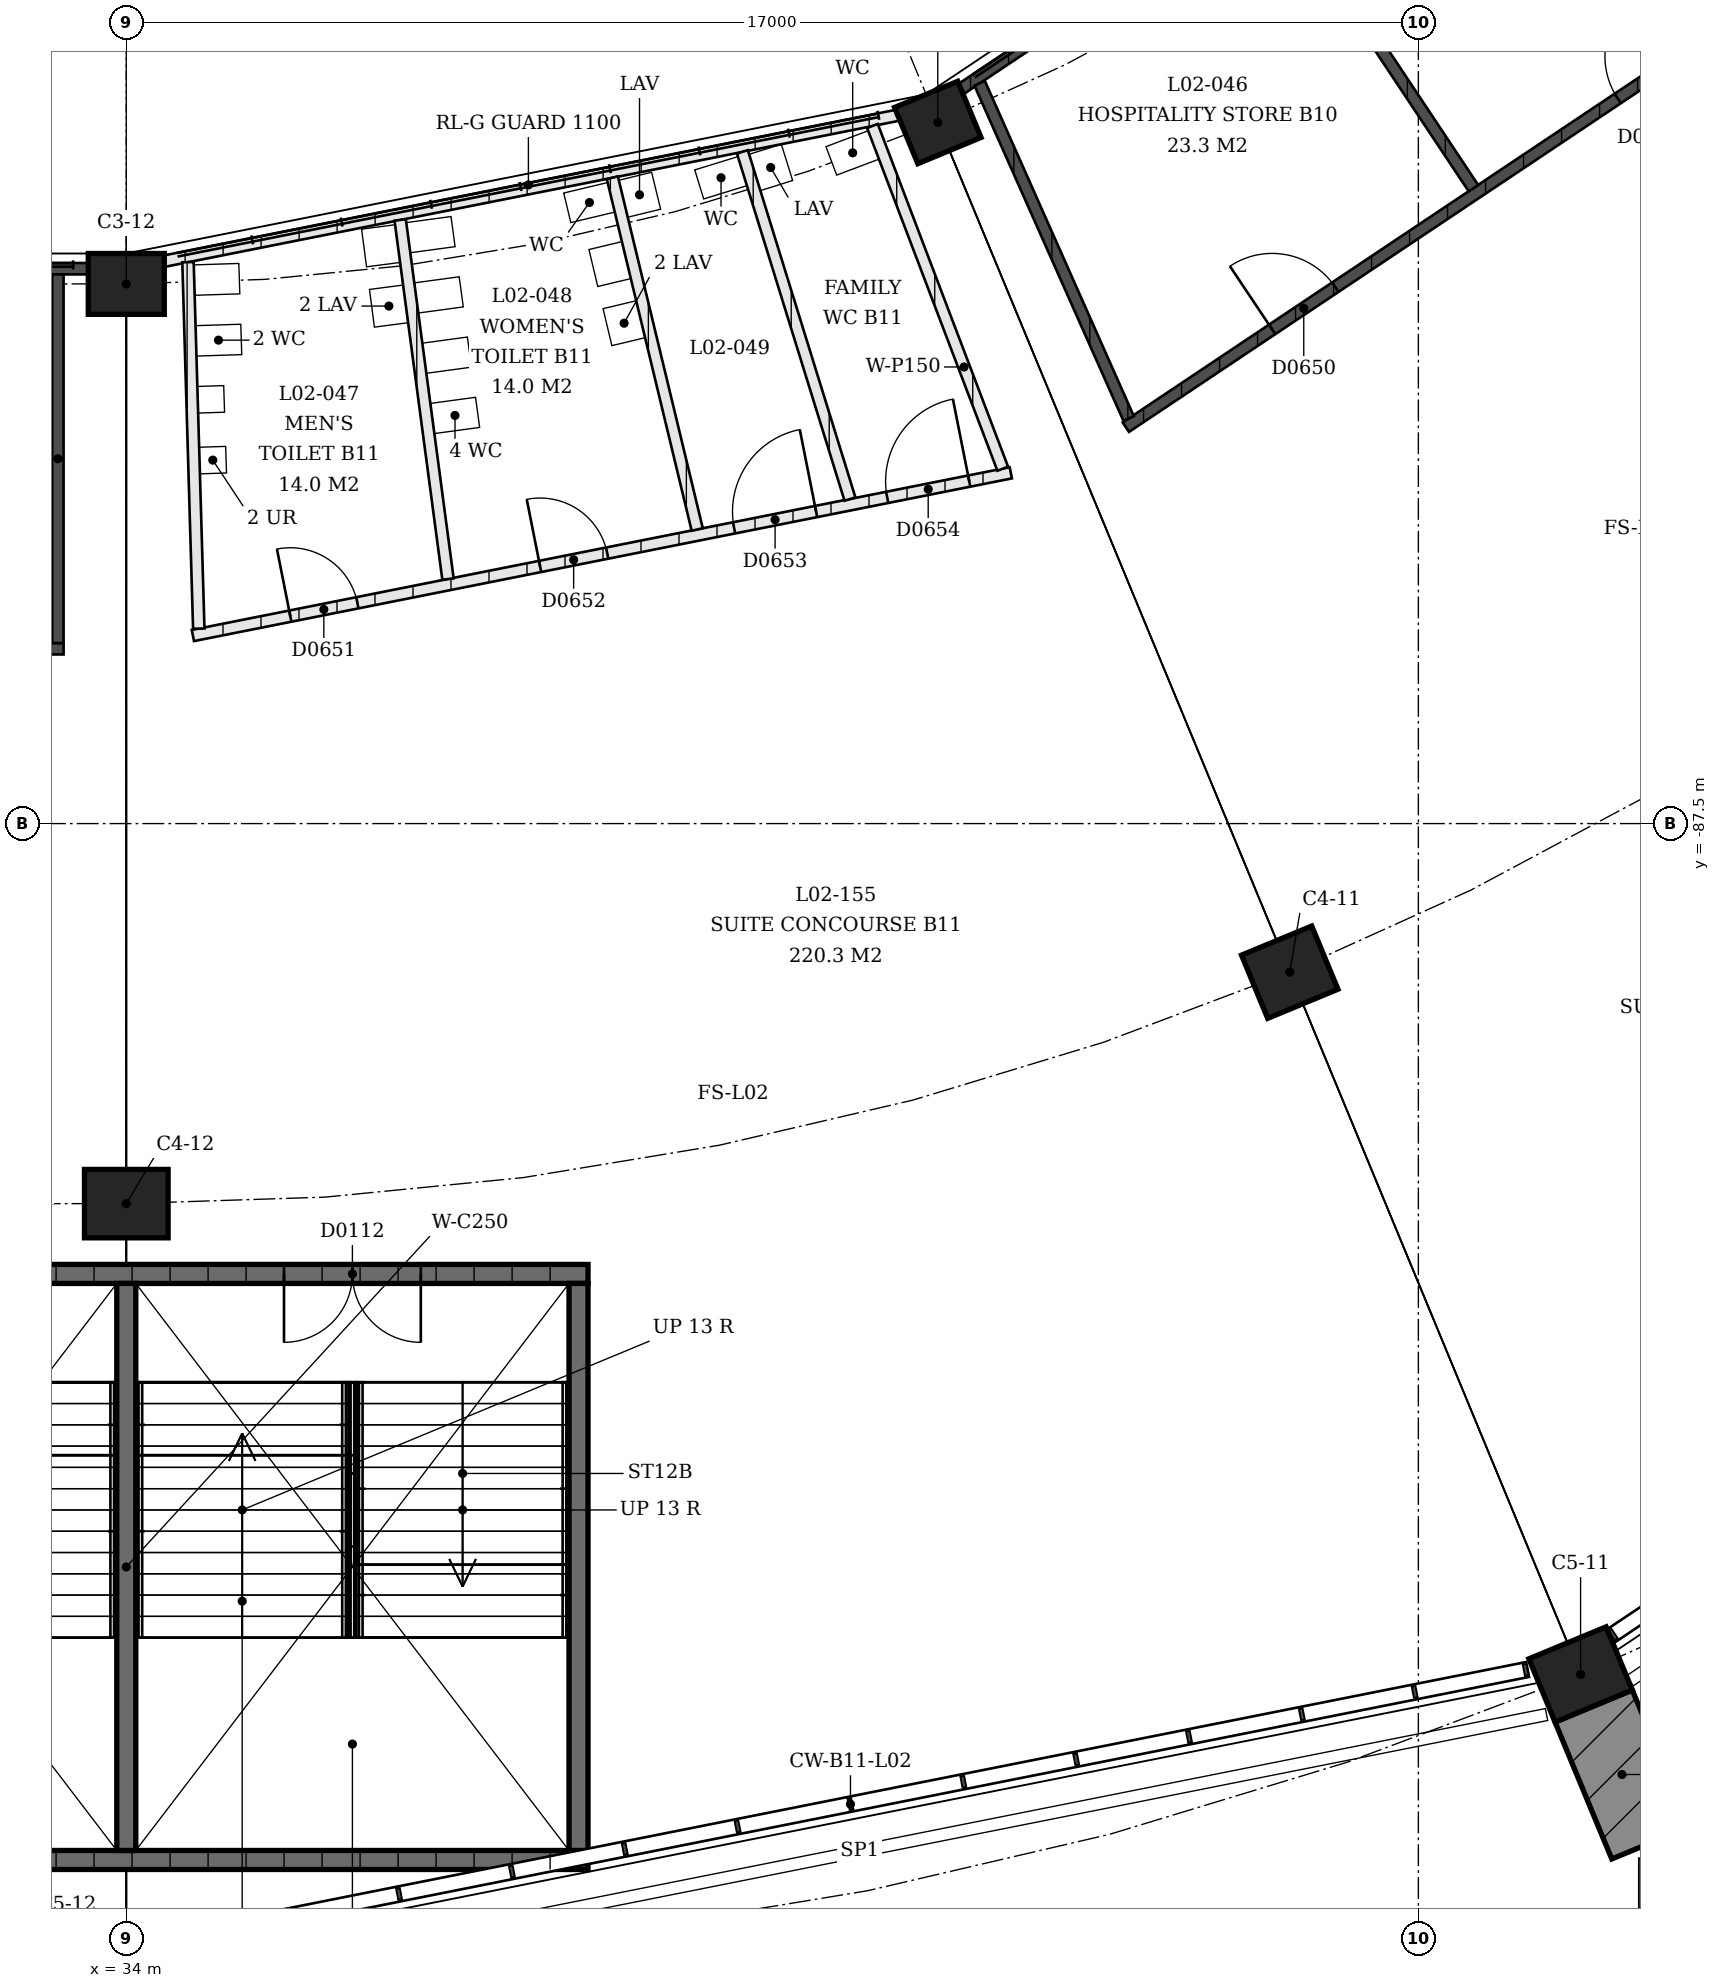
"""IFC4 building model, lengths in metres.
Left out: names, types, materials, properties, quantities, classifications, styles, units other than length and angle.
Written with IfcOpenShell. Run it as: python <this file> out.ifc"""

import sys

from ifc_helpers import new_model, si_unit, direction, frame, frame_2d, origin, origin_2d, place, context, subcontext, project, spatial, rectangle, extrude, element, fill, save


model = new_model("IFC4")
c1 = context("Model", 3, precision=1e-05, world=origin(), true_north=direction((0.0, 1.0)))
c2 = subcontext(c1, "Body", "Model", "MODEL_VIEW")
j1 = project(units=[si_unit("LENGTHUNIT", "METRE"), si_unit("PLANEANGLEUNIT", "RADIAN")], contexts=[c1])
p1 = place(None, origin())
s1 = spatial("IfcSite", under=j1, at=p1, CompositionType="ELEMENT")
p2 = place(p1, origin())
s2 = spatial("IfcBuilding", under=s1, at=p2, CompositionType="ELEMENT")
p3 = place(p2, frame((0.0, 0.0, 9.0)))
s3 = spatial("IfcBuildingStorey", under=s2, at=p3, CompositionType="ELEMENT", Elevation=9.0)
p4 = place(p3, frame((44.677, -78.276, 0.0), z_axis=(0.0, 0.0, 1.0), x_axis=(0.923879532511, 0.382683432365, 0.0)))
e1 = element("IfcColumn", 1, at=p4, inside=s3, PredefinedType="COLUMN", context=c2, shape_type="SweptSolid", body=[
    extrude(rectangle(XDim=0.9, YDim=0.8, at=origin_2d()), origin(), (0.0, 0.0, 1.0), 4.5),
])
p5 = place(p3, frame((49.307, -89.455, 0.0), z_axis=(0.0, 0.0, 1.0), x_axis=(0.923879532511, 0.382683432365, 0.0)))
e2 = element("IfcColumn", 2, at=p5, inside=s3, PredefinedType="COLUMN", context=c2, shape_type="SweptSolid", body=[
    extrude(rectangle(XDim=1.0, YDim=0.9, at=origin_2d()), origin(), (0.0, 0.0, 1.0), 4.5),
])
p6 = place(p3, frame((53.134, -98.694, 0.0), z_axis=(0.0, 0.0, 1.0), x_axis=(0.923879532511, 0.382683432365, 0.0)))
e3 = element("IfcColumn", 3, at=p6, inside=s3, PredefinedType="COLUMN", context=c2, shape_type="SweptSolid", body=[
    extrude(rectangle(XDim=1.1, YDim=0.9, at=origin_2d()), origin(), (0.0, 0.0, 1.0), 4.5),
])
p7 = place(p3, frame((34.0, -80.4, 0.0), z_axis=(0.0, 0.0, 1.0), x_axis=(1.0, 0.0, 0.0)))
e4 = element("IfcColumn", 4, at=p7, inside=s3, PredefinedType="COLUMN", context=c2, shape_type="SweptSolid", body=[
    extrude(rectangle(XDim=1.0, YDim=0.8, at=origin_2d()), origin(), (0.0, 0.0, 1.0), 4.5),
])
p8 = place(p3, frame((34.0, -92.5, 0.0), z_axis=(0.0, 0.0, 1.0), x_axis=(1.0, 0.0, 0.0)))
e5 = element("IfcColumn", 5, at=p8, inside=s3, PredefinedType="COLUMN", context=c2, shape_type="SweptSolid", body=[
    extrude(rectangle(XDim=1.1, YDim=0.9, at=origin_2d()), origin(), (0.0, 0.0, 1.0), 4.5),
])
p9 = place(p3, frame((27.925, -93.425, 0.0), z_axis=(0.0, 0.0, 1.0), x_axis=(1.0, 0.0, 0.0)))
e6 = element("IfcWall", 6, at=p9, inside=s3, PredefinedType="SHEAR", context=c2, shape_type="SweptSolid", body=[
    extrude(rectangle(XDim=12.15, YDim=0.25, at=frame_2d((6.075, 0.0))), origin(), (0.0, 0.0, 1.0), 4.09),
])
p10 = place(p9, frame((2.2, 0.0, 0.0)))
e7 = element("IfcOpeningElement", 7, at=p10, cuts=e6, PredefinedType="OPENING", context=c2, shape_type="SweptSolid", body=[
    extrude(rectangle(XDim=1.8, YDim=2.1, at=frame_2d((0.9, 1.05))), frame((0.0, 0.125, 0.0), z_axis=(0.0, -1.0, 0.0), x_axis=(1.0, 0.0, 0.0)), (0.0, 0.0, 1.0), 0.25),
])
p11 = place(p9, frame((8.15, 0.0, 0.0)))
e8 = element("IfcOpeningElement", 8, at=p11, cuts=e6, PredefinedType="OPENING", context=c2, shape_type="SweptSolid", body=[
    extrude(rectangle(XDim=1.8, YDim=2.1, at=frame_2d((0.9, 1.05))), frame((0.0, 0.125, 0.0), z_axis=(0.0, -1.0, 0.0), x_axis=(1.0, 0.0, 0.0)), (0.0, 0.0, 1.0), 0.25),
])
p12 = place(p3, frame((27.925, -101.135, 0.0), z_axis=(0.0, 0.0, 1.0), x_axis=(1.0, 0.0, 0.0)))
e9 = element("IfcWall", 9, at=p12, inside=s3, PredefinedType="SHEAR", context=c2, shape_type="SweptSolid", body=[
    extrude(rectangle(XDim=12.15, YDim=0.25, at=frame_2d((6.075, 0.0))), origin(), (0.0, 0.0, 1.0), 4.09),
])
for number, where, z_axis, x_axis in (
    (10, (39.95, -93.55, 0.0), (0.0, 0.0, 1.0), (0.0, -1.0, 0.0)),
    (11, (34.0, -93.55, 0.0), (0.0, 0.0, 1.0), (0.0, -1.0, 0.0)),
):
    element("IfcWall", number, at=place(p3, frame(where, z_axis=z_axis, x_axis=x_axis)), inside=s3, PredefinedType="SHEAR", context=c2, shape_type="SweptSolid", body=[
        extrude(rectangle(XDim=7.46, YDim=0.25, at=frame_2d((3.73, 0.0))), origin(), (0.0, 0.0, 1.0), 4.09),
    ])
p13 = place(p3, frame((53.205, -72.342, 0.0), z_axis=(0.0, 0.0, 1.0), x_axis=(-0.831461186136, -0.555582843463, 0.0)))
e12 = element("IfcWall", 12, at=p13, inside=s3, PredefinedType="SOLIDWALL", context=c2, shape_type="SweptSolid", body=[
    extrude(rectangle(XDim=9.89, YDim=0.15, at=frame_2d((4.945, 0.0))), origin(), (0.0, 0.0, 1.0), 3.0),
])
p14 = place(p3, frame((56.38, -76.119, 0.0), z_axis=(0.0, 0.0, 1.0), x_axis=(-0.831471162003, -0.555567913722, 0.0)))
e13 = element("IfcWall", 13, at=p14, inside=s3, PredefinedType="SOLIDWALL", context=c2, shape_type="SweptSolid", body=[
    extrude(rectangle(XDim=11.099, YDim=0.15, at=frame_2d((5.55, 0.0))), origin(), (0.0, 0.0, 1.0), 3.0),
])
p15 = place(p14, frame((2.315, 0.0, 0.0)))
e14 = element("IfcOpeningElement", 14, at=p15, cuts=e13, PredefinedType="OPENING", context=c2, shape_type="SweptSolid", body=[
    extrude(rectangle(XDim=1.0, YDim=2.1, at=frame_2d((0.5, 1.05))), frame((0.0, 0.075, 0.0), z_axis=(0.0, -1.0, 0.0), x_axis=(1.0, 0.0, 0.0)), (0.0, 0.0, 1.0), 0.15),
])
p16 = place(p14, frame((7.784, 0.0, 0.0)))
e15 = element("IfcOpeningElement", 15, at=p16, cuts=e13, PredefinedType="OPENING", context=c2, shape_type="SweptSolid", body=[
    extrude(rectangle(XDim=1.0, YDim=2.1, at=frame_2d((0.5, 1.05))), frame((0.0, 0.075, 0.0), z_axis=(0.0, -1.0, 0.0), x_axis=(1.0, 0.0, 0.0)), (0.0, 0.0, 1.0), 0.15),
])
p17 = place(p3, frame((49.09, -75.18, 0.0), z_axis=(0.0, 0.0, 1.0), x_axis=(0.553930112441, -0.832563169093, 0.0)))
e16 = element("IfcWall", 16, at=p17, inside=s3, PredefinedType="SOLIDWALL", context=c2, shape_type="SweptSolid", body=[
    extrude(rectangle(XDim=4.757, YDim=0.15, at=frame_2d((2.378, 0.0))), origin(), (0.0, 0.0, 1.0), 3.0),
])
p18 = place(p3, frame((45.228, -77.761, 0.0), z_axis=(0.0, 0.0, 1.0), x_axis=(0.406147851791, -0.913807377124, 0.0)))
e17 = element("IfcWall", 17, at=p18, inside=s3, PredefinedType="SOLIDWALL", context=c2, shape_type="SweptSolid", body=[
    extrude(rectangle(XDim=4.827, YDim=0.15, at=frame_2d((2.414, 0.0))), origin(), (0.0, 0.0, 1.0), 3.0),
])
p19 = place(p3, frame((34.5, -80.101, 0.0), z_axis=(0.0, 0.0, 1.0), x_axis=(0.980783419557, 0.195099676887, 0.0)))
e18 = element("IfcWall", 18, at=p19, inside=s3, PredefinedType="PARTITIONING", context=c2, shape_type="SweptSolid", body=[
    extrude(rectangle(XDim=9.839, YDim=0.15, at=frame_2d((4.92, 0.0))), origin(), (0.0, 0.0, 1.0), 3.0),
])
p20 = place(p3, frame((34.876, -85.026, 0.0), z_axis=(0.0, 0.0, 1.0), x_axis=(0.980788934186, 0.195071952313, 0.0)))
e19 = element("IfcWall", 19, at=p20, inside=s3, PredefinedType="PARTITIONING", context=c2, shape_type="SweptSolid", body=[
    extrude(rectangle(XDim=10.972, YDim=0.15, at=frame_2d((5.486, 0.0))), origin(), (0.0, 0.0, 1.0), 3.0),
])
p21 = place(p20, frame((1.307, 0.0, 0.0)))
e20 = element("IfcOpeningElement", 20, at=p21, cuts=e19, PredefinedType="OPENING", context=c2, shape_type="SweptSolid", body=[
    extrude(rectangle(XDim=0.9, YDim=2.1, at=frame_2d((0.45, 1.05))), frame((0.0, 0.075, 0.0), z_axis=(0.0, -1.0, 0.0), x_axis=(1.0, 0.0, 0.0)), (0.0, 0.0, 1.0), 0.15),
])
p22 = place(p20, frame((4.658, 0.0, 0.0)))
e21 = element("IfcOpeningElement", 21, at=p22, cuts=e19, PredefinedType="OPENING", context=c2, shape_type="SweptSolid", body=[
    extrude(rectangle(XDim=0.9, YDim=2.1, at=frame_2d((0.45, 1.05))), frame((0.0, 0.075, 0.0), z_axis=(0.0, -1.0, 0.0), x_axis=(1.0, 0.0, 0.0)), (0.0, 0.0, 1.0), 0.15),
])
p23 = place(p20, frame((7.26, 0.0, 0.0)))
e22 = element("IfcOpeningElement", 22, at=p23, cuts=e19, PredefinedType="OPENING", context=c2, shape_type="SweptSolid", body=[
    extrude(rectangle(XDim=1.1, YDim=2.1, at=frame_2d((0.55, 1.05))), frame((0.0, 0.075, 0.0), z_axis=(0.0, -1.0, 0.0), x_axis=(1.0, 0.0, 0.0)), (0.0, 0.0, 1.0), 0.15),
])
p24 = place(p20, frame((9.314, 0.0, 0.0)))
e23 = element("IfcOpeningElement", 23, at=p24, cuts=e19, PredefinedType="OPENING", context=c2, shape_type="SweptSolid", body=[
    extrude(rectangle(XDim=1.1, YDim=2.1, at=frame_2d((0.55, 1.05))), frame((0.0, 0.075, 0.0), z_axis=(0.0, -1.0, 0.0), x_axis=(1.0, 0.0, 0.0)), (0.0, 0.0, 1.0), 0.15),
])
p25 = place(p3, frame((34.812, -80.114, 0.0), z_axis=(0.0, 0.0, 1.0), x_axis=(0.029405000692, -0.999567579473, 0.0)))
e24 = element("IfcWall", 24, at=p25, inside=s3, PredefinedType="PARTITIONING", context=c2, shape_type="SweptSolid", body=[
    extrude(rectangle(XDim=4.824, YDim=0.15, at=frame_2d((2.412, 0.0))), origin(), (0.0, 0.0, 1.0), 3.0),
])
p26 = place(p3, frame((37.604, -79.558, 0.0), z_axis=(0.0, 0.0, 1.0), x_axis=(0.131992613728, -0.991250699834, 0.0)))
e25 = element("IfcWall", 25, at=p26, inside=s3, PredefinedType="PARTITIONING", context=c2, shape_type="SweptSolid", body=[
    extrude(rectangle(XDim=4.767, YDim=0.15, at=frame_2d((2.383, 0.0))), origin(), (0.0, 0.0, 1.0), 3.0),
])
p27 = place(p3, frame((40.395, -79.003, 0.0), z_axis=(0.0, 0.0, 1.0), x_axis=(0.234563667056, -0.972100759231, 0.0)))
e26 = element("IfcWall", 26, at=p27, inside=s3, PredefinedType="PARTITIONING", context=c2, shape_type="SweptSolid", body=[
    extrude(rectangle(XDim=4.761, YDim=0.15, at=frame_2d((2.38, 0.0))), origin(), (0.0, 0.0, 1.0), 3.0),
])
p28 = place(p3, frame((42.106, -78.663, 0.0), z_axis=(0.0, 0.0, 1.0), x_axis=(0.295972093403, -0.955196587058, 0.0)))
e27 = element("IfcWall", 27, at=p28, inside=s3, PredefinedType="PARTITIONING", context=c2, shape_type="SweptSolid", body=[
    extrude(rectangle(XDim=4.783, YDim=0.15, at=frame_2d((2.391, 0.0))), origin(), (0.0, 0.0, 1.0), 3.0),
])
p29 = place(p3, frame((43.817, -78.322, 0.0), z_axis=(0.0, 0.0, 1.0), x_axis=(0.35538492255, -0.934720041951, 0.0)))
e28 = element("IfcWall", 28, at=p29, inside=s3, PredefinedType="PARTITIONING", context=c2, shape_type="SweptSolid", body=[
    extrude(rectangle(XDim=4.824, YDim=0.15, at=frame_2d((2.412, 0.0))), origin(), (0.0, 0.0, 1.0), 3.0),
])
p30 = place(p3, frame((33.5, -80.2, 0.0), z_axis=(0.0, 0.0, 1.0), x_axis=(-1.0, 0.0, 0.0)))
e29 = element("IfcWall", 29, at=p30, inside=s3, PredefinedType="SOLIDWALL", context=c2, shape_type="SweptSolid", body=[
    extrude(rectangle(XDim=12.275, YDim=0.15, at=frame_2d((6.137, 0.0))), origin(), (0.0, 0.0, 1.0), 3.0),
])
p31 = place(p3, frame((33.175, -85.2, 0.0), z_axis=(0.0, 0.0, 1.0), x_axis=(-1.0, 0.0, 0.0)))
e30 = element("IfcWall", 30, at=p31, inside=s3, PredefinedType="SOLIDWALL", context=c2, shape_type="SweptSolid", body=[
    extrude(rectangle(XDim=11.95, YDim=0.15, at=frame_2d((5.975, 0.0))), origin(), (0.0, 0.0, 1.0), 3.0),
])
p32 = place(p31, frame((2.525, 0.0, 0.0)))
e31 = element("IfcOpeningElement", 31, at=p32, cuts=e30, PredefinedType="OPENING", context=c2, shape_type="SweptSolid", body=[
    extrude(rectangle(XDim=1.0, YDim=2.1, at=frame_2d((0.5, 1.05))), frame((0.0, 0.075, 0.0), z_axis=(0.0, -1.0, 0.0), x_axis=(1.0, 0.0, 0.0)), (0.0, 0.0, 1.0), 0.15),
])
p33 = place(p31, frame((8.425, 0.0, 0.0)))
e32 = element("IfcOpeningElement", 32, at=p33, cuts=e30, PredefinedType="OPENING", context=c2, shape_type="SweptSolid", body=[
    extrude(rectangle(XDim=1.0, YDim=2.1, at=frame_2d((0.5, 1.05))), frame((0.0, 0.075, 0.0), z_axis=(0.0, -1.0, 0.0), x_axis=(1.0, 0.0, 0.0)), (0.0, 0.0, 1.0), 0.15),
])
p34 = place(p3, frame((33.1, -80.275, 0.0), z_axis=(0.0, 0.0, 1.0), x_axis=(0.0, -1.0, 0.0)))
e33 = element("IfcWall", 33, at=p34, inside=s3, PredefinedType="SOLIDWALL", context=c2, shape_type="SweptSolid", body=[
    extrude(rectangle(XDim=4.85, YDim=0.15, at=frame_2d((2.425, 0.0))), origin(), (0.0, 0.0, 1.0), 3.0),
])
p35 = place(p11, origin())
e34 = element("IfcDoor", 34, at=p35, inside=s3, OperationType="DOUBLE_DOOR_SINGLE_SWING", PredefinedType="DOOR", context=c2, shape_type="SweptSolid", body=[
    extrude(rectangle(XDim=1.8, YDim=2.1, at=frame_2d((0.9, 1.05))), frame((0.0, 0.025, 0.0), z_axis=(0.0, -1.0, 0.0), x_axis=(1.0, 0.0, 0.0)), (0.0, 0.0, 1.0), 0.05),
])
fill(e8, e34)
p36 = place(p15, origin())
e35 = element("IfcDoor", 35, at=p36, inside=s3, OperationType="SINGLE_SWING_LEFT", PredefinedType="DOOR", context=c2, shape_type="SweptSolid", body=[
    extrude(rectangle(XDim=1.0, YDim=2.1, at=frame_2d((0.5, 1.05))), frame((0.0, 0.025, 0.0), z_axis=(0.0, -1.0, 0.0), x_axis=(1.0, 0.0, 0.0)), (0.0, 0.0, 1.0), 0.05),
])
fill(e14, e35)
p37 = place(p16, origin())
e36 = element("IfcDoor", 36, at=p37, inside=s3, OperationType="SINGLE_SWING_RIGHT", PredefinedType="DOOR", context=c2, shape_type="SweptSolid", body=[
    extrude(rectangle(XDim=1.0, YDim=2.1, at=frame_2d((0.5, 1.05))), frame((0.0, 0.025, 0.0), z_axis=(0.0, -1.0, 0.0), x_axis=(1.0, 0.0, 0.0)), (0.0, 0.0, 1.0), 0.05),
])
fill(e15, e36)
p38 = place(p21, origin())
e37 = element("IfcDoor", 37, at=p38, inside=s3, OperationType="SINGLE_SWING_RIGHT", PredefinedType="DOOR", context=c2, shape_type="SweptSolid", body=[
    extrude(rectangle(XDim=0.9, YDim=2.1, at=frame_2d((0.45, 1.05))), frame((0.0, 0.025, 0.0), z_axis=(0.0, -1.0, 0.0), x_axis=(1.0, 0.0, 0.0)), (0.0, 0.0, 1.0), 0.05),
])
fill(e20, e37)
p39 = place(p22, origin())
e38 = element("IfcDoor", 38, at=p39, inside=s3, OperationType="SINGLE_SWING_RIGHT", PredefinedType="DOOR", context=c2, shape_type="SweptSolid", body=[
    extrude(rectangle(XDim=0.9, YDim=2.1, at=frame_2d((0.45, 1.05))), frame((0.0, 0.025, 0.0), z_axis=(0.0, -1.0, 0.0), x_axis=(1.0, 0.0, 0.0)), (0.0, 0.0, 1.0), 0.05),
])
fill(e21, e38)
p40 = place(p23, origin())
e39 = element("IfcDoor", 39, at=p40, inside=s3, OperationType="SINGLE_SWING_LEFT", PredefinedType="DOOR", context=c2, shape_type="SweptSolid", body=[
    extrude(rectangle(XDim=1.1, YDim=2.1, at=frame_2d((0.55, 1.05))), frame((0.0, 0.025, 0.0), z_axis=(0.0, -1.0, 0.0), x_axis=(1.0, 0.0, 0.0)), (0.0, 0.0, 1.0), 0.05),
])
fill(e22, e39)
p41 = place(p24, origin())
e40 = element("IfcDoor", 40, at=p41, inside=s3, OperationType="SINGLE_SWING_LEFT", PredefinedType="DOOR", context=c2, shape_type="SweptSolid", body=[
    extrude(rectangle(XDim=1.1, YDim=2.1, at=frame_2d((0.55, 1.05))), frame((0.0, 0.025, 0.0), z_axis=(0.0, -1.0, 0.0), x_axis=(1.0, 0.0, 0.0)), (0.0, 0.0, 1.0), 0.05),
])
fill(e23, e40)
save(model, sys.argv[1])
